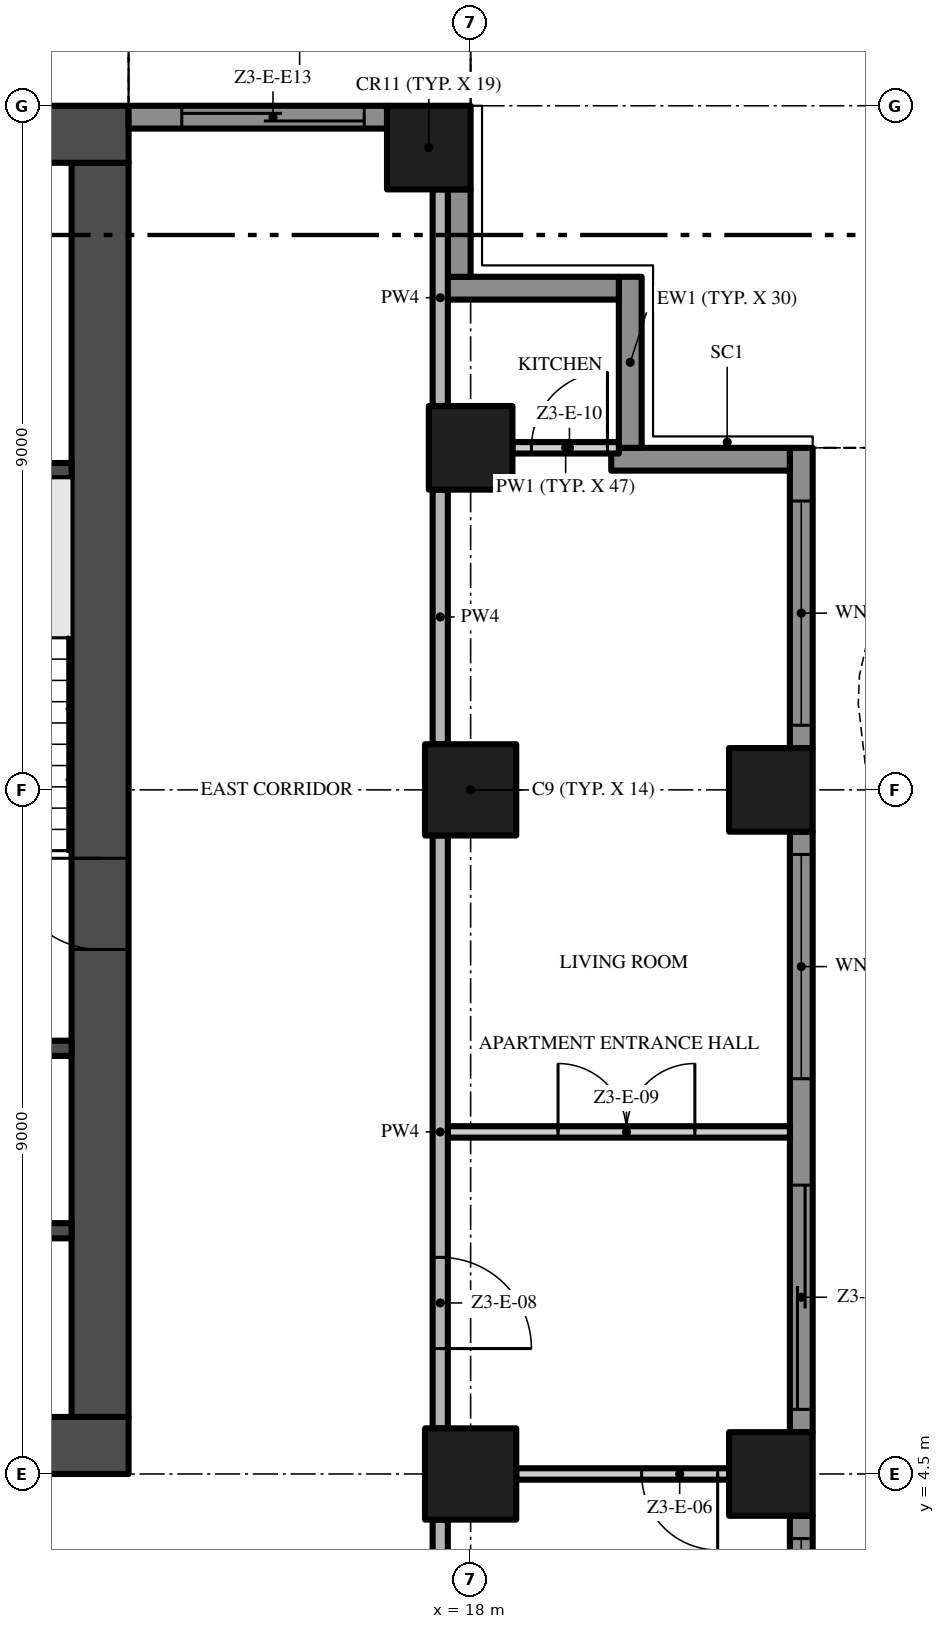
"""IFC4 building model, lengths in metres.
Left out: names, types, materials, properties, quantities, classifications, styles, units other than length and angle.
Written with IfcOpenShell. Run it as: python <this file> out.ifc"""

import sys

from ifc_helpers import new_model, si_unit, direction, frame, frame_2d, origin, origin_2d, place, context, subcontext, project, spatial, polyline, rectangle, outline, extrude, element, fill, save


model = new_model("IFC4")
c1 = context("Model", 3, precision=1e-05, world=origin(), true_north=direction((0.0, 1.0)))
c2 = subcontext(c1, "Body", "Model", "MODEL_VIEW")
j1 = project(units=[si_unit("LENGTHUNIT", "METRE"), si_unit("PLANEANGLEUNIT", "RADIAN")], contexts=[c1])
p1 = place(None, origin())
s1 = spatial("IfcSite", under=j1, at=p1, CompositionType="ELEMENT")
p2 = place(p1, origin())
s2 = spatial("IfcBuilding", under=s1, at=p2, CompositionType="ELEMENT")
p3 = place(p2, frame((0.0, 0.0, 170.6)))
s3 = spatial("IfcBuildingStorey", under=s2, at=p3, CompositionType="ELEMENT", Elevation=170.6)
p4 = place(p3, frame((-13.5, 4.875, -0.3), z_axis=(0.0, 0.0, 1.0), x_axis=(1.0, 0.0, 0.0)))
e1 = element("IfcWall", 1, at=p4, inside=s3, PredefinedType="SHEAR", context=c2, shape_type="SweptSolid", body=[
    extrude(rectangle(XDim=27.0, YDim=0.75, at=frame_2d((13.5, 0.0))), origin(), (0.0, 0.0, 1.0), 3.8),
])
p5 = place(p4, frame((12.0, 0.0, 0.3)))
e2 = element("IfcOpeningElement", 2, at=p5, cuts=e1, PredefinedType="OPENING", context=c2, shape_type="SweptSolid", body=[
    extrude(rectangle(XDim=3.0, YDim=2.4, at=frame_2d((1.5, 1.2))), frame((0.0, 0.385, 0.0), z_axis=(0.0, -1.0, 0.0), x_axis=(1.0, 0.0, 0.0)), (0.0, 0.0, 1.0), 0.77),
])
p6 = place(p4, frame((4.9, 0.0, 0.3)))
e3 = element("IfcOpeningElement", 3, at=p6, cuts=e1, PredefinedType="OPENING", context=c2, shape_type="SweptSolid", body=[
    extrude(rectangle(XDim=1.2, YDim=2.2, at=frame_2d((0.6, 1.1))), frame((0.0, 0.385, 0.0), z_axis=(0.0, -1.0, 0.0), x_axis=(1.0, 0.0, 0.0)), (0.0, 0.0, 1.0), 0.77),
])
p7 = place(p4, frame((20.75, 0.0, 0.3)))
e4 = element("IfcOpeningElement", 4, at=p7, cuts=e1, PredefinedType="OPENING", context=c2, shape_type="SweptSolid", body=[
    extrude(rectangle(XDim=1.5, YDim=2.2, at=frame_2d((0.75, 1.1))), frame((0.0, 0.385, 0.0), z_axis=(0.0, -1.0, 0.0), x_axis=(1.0, 0.0, 0.0)), (0.0, 0.0, 1.0), 0.77),
])
p8 = place(p4, frame((17.4, 0.0, 0.3)))
e5 = element("IfcOpeningElement", 5, at=p8, cuts=e1, PredefinedType="OPENING", context=c2, shape_type="SweptSolid", body=[
    extrude(rectangle(XDim=1.2, YDim=2.2, at=frame_2d((0.6, 1.1))), frame((0.0, 0.385, 0.0), z_axis=(0.0, -1.0, 0.0), x_axis=(1.0, 0.0, 0.0)), (0.0, 0.0, 1.0), 0.77),
])
p9 = place(p3, frame((13.125, 5.25, -0.3), z_axis=(0.0, 0.0, 1.0), x_axis=(0.0, 1.0, 0.0)))
e6 = element("IfcWall", 6, at=p9, inside=s3, PredefinedType="SHEAR", context=c2, shape_type="SweptSolid", body=[
    extrude(rectangle(XDim=16.5, YDim=0.75, at=frame_2d((8.25, 0.0))), origin(), (0.0, 0.0, 1.0), 3.8),
])
p10 = place(p9, frame((6.15, 0.0, 0.3)))
e7 = element("IfcOpeningElement", 7, at=p10, cuts=e6, PredefinedType="OPENING", context=c2, shape_type="SweptSolid", body=[
    extrude(rectangle(XDim=1.2, YDim=2.2, at=frame_2d((0.6, 1.1))), frame((0.0, 0.385, 0.0), z_axis=(0.0, -1.0, 0.0), x_axis=(1.0, 0.0, 0.0)), (0.0, 0.0, 1.0), 0.77),
])
p11 = place(p3, frame((13.5, 22.125, -0.3), z_axis=(0.0, 0.0, 1.0), x_axis=(-1.0, 0.0, 0.0)))
e8 = element("IfcWall", 8, at=p11, inside=s3, PredefinedType="SHEAR", context=c2, shape_type="SweptSolid", body=[
    extrude(rectangle(XDim=27.0, YDim=0.75, at=frame_2d((13.5, 0.0))), origin(), (0.0, 0.0, 1.0), 3.8),
])
p12 = place(p3, frame((18.0, 13.5, 0.0), z_axis=(0.0, 0.0, 1.0), x_axis=(1.0, 0.0, 0.0)))
e9 = element("IfcColumn", 9, at=p12, inside=s3, PredefinedType="COLUMN", context=c2, shape_type="SweptSolid", body=[
    extrude(rectangle(XDim=1.2, YDim=1.2, at=origin_2d()), origin(), (0.0, 0.0, 1.0), 3.5),
])
p13 = place(p3, frame((17.45, 21.95, 0.0), z_axis=(0.0, 0.0, 1.0), x_axis=(1.0, 0.0, 0.0)))
e10 = element("IfcColumn", 10, at=p13, inside=s3, PredefinedType="COLUMN", context=c2, shape_type="SweptSolid", body=[
    extrude(rectangle(XDim=1.1, YDim=1.1, at=origin_2d()), origin(), (0.0, 0.0, 1.0), 3.5),
])
p14 = place(p3, frame((18.0, 4.5, 0.0), z_axis=(0.0, 0.0, 1.0), x_axis=(1.0, 0.0, 0.0)))
e11 = element("IfcColumn", 11, at=p14, inside=s3, PredefinedType="COLUMN", context=c2, shape_type="SweptSolid", body=[
    extrude(rectangle(XDim=1.2, YDim=1.2, at=origin_2d()), origin(), (0.0, 0.0, 1.0), 3.5),
])
for number, where, z_axis, x_axis in (
    (12, (21.95, 13.5, 0.0), (0.0, 0.0, 1.0), (1.0, 0.0, 0.0)),
    (13, (18.0, 18.0, 0.0), (0.0, 0.0, 1.0), (1.0, 0.0, 0.0)),
    (14, (21.95, 4.5, 0.0), (0.0, 0.0, 1.0), (1.0, 0.0, 0.0)),
):
    element("IfcColumn", number, at=place(p3, frame(where, z_axis=z_axis, x_axis=x_axis)), inside=s3, PredefinedType="COLUMN", context=c2, shape_type="SweptSolid", body=[
        extrude(rectangle(XDim=1.1, YDim=1.1, at=origin_2d()), origin(), (0.0, 0.0, 1.0), 3.5),
    ])
p15 = place(p3, frame((22.35, 3.95, 0.0), z_axis=(0.0, 0.0, 1.0), x_axis=(0.0, -1.0, 0.0)))
e15 = element("IfcWall", 15, at=p15, inside=s3, PredefinedType="SOLIDWALL", context=c2, shape_type="SweptSolid", body=[
    extrude(rectangle(XDim=7.9, YDim=0.3, at=frame_2d((3.95, 0.0))), origin(), (0.0, 0.0, 1.0), 3.5),
])
p16 = place(p15, frame((4.65, 0.0, 0.45)))
e16 = element("IfcOpeningElement", 16, at=p16, cuts=e15, PredefinedType="OPENING", context=c2, shape_type="SweptSolid", body=[
    extrude(rectangle(XDim=2.95, YDim=2.65, at=frame_2d((1.475, 1.325))), frame((0.0, 0.16, 0.0), z_axis=(0.0, -1.0, 0.0), x_axis=(1.0, 0.0, 0.0)), (0.0, 0.0, 1.0), 0.32),
])
p17 = place(p15, frame((0.3, 0.0, 0.45)))
e17 = element("IfcOpeningElement", 17, at=p17, cuts=e15, PredefinedType="OPENING", context=c2, shape_type="SweptSolid", body=[
    extrude(rectangle(XDim=2.95, YDim=2.65, at=frame_2d((1.475, 1.325))), frame((0.0, 0.16, 0.0), z_axis=(0.0, -1.0, 0.0), x_axis=(1.0, 0.0, 0.0)), (0.0, 0.0, 1.0), 0.32),
])
p18 = place(p3, frame((22.35, 12.95, 0.0), z_axis=(0.0, 0.0, 1.0), x_axis=(0.0, -1.0, 0.0)))
e18 = element("IfcWall", 18, at=p18, inside=s3, PredefinedType="SOLIDWALL", context=c2, shape_type="SweptSolid", body=[
    extrude(rectangle(XDim=7.9, YDim=0.3, at=frame_2d((3.95, 0.0))), origin(), (0.0, 0.0, 1.0), 3.5),
])
p19 = place(p18, frame((4.65, 0.0, 0.0)))
e19 = element("IfcOpeningElement", 19, at=p19, cuts=e18, PredefinedType="OPENING", context=c2, shape_type="SweptSolid", body=[
    extrude(rectangle(XDim=2.95, YDim=2.4, at=frame_2d((1.475, 1.2))), frame((0.0, 0.16, 0.0), z_axis=(0.0, -1.0, 0.0), x_axis=(1.0, 0.0, 0.0)), (0.0, 0.0, 1.0), 0.32),
])
p20 = place(p18, frame((0.3, 0.0, 0.45)))
e20 = element("IfcOpeningElement", 20, at=p20, cuts=e18, PredefinedType="OPENING", context=c2, shape_type="SweptSolid", body=[
    extrude(rectangle(XDim=2.95, YDim=2.65, at=frame_2d((1.475, 1.325))), frame((0.0, 0.16, 0.0), z_axis=(0.0, -1.0, 0.0), x_axis=(1.0, 0.0, 0.0)), (0.0, 0.0, 1.0), 0.32),
])
p21 = place(p3, frame((22.35, 18.0, 0.0), z_axis=(0.0, 0.0, 1.0), x_axis=(0.0, -1.0, 0.0)))
e21 = element("IfcWall", 21, at=p21, inside=s3, PredefinedType="SOLIDWALL", context=c2, shape_type="SweptSolid", body=[
    extrude(rectangle(XDim=3.95, YDim=0.3, at=frame_2d((1.975, 0.0))), origin(), (0.0, 0.0, 1.0), 3.5),
])
p22 = place(p21, frame((0.7, 0.0, 0.45)))
e22 = element("IfcOpeningElement", 22, at=p22, cuts=e21, PredefinedType="OPENING", context=c2, shape_type="SweptSolid", body=[
    extrude(rectangle(XDim=2.95, YDim=2.65, at=frame_2d((1.475, 1.325))), frame((0.0, 0.16, 0.0), z_axis=(0.0, -1.0, 0.0), x_axis=(1.0, 0.0, 0.0)), (0.0, 0.0, 1.0), 0.32),
])
p23 = place(p3, frame((19.85, 17.85, 0.0), z_axis=(0.0, 0.0, 1.0), x_axis=(1.0, 0.0, 0.0)))
e23 = element("IfcWall", 23, at=p23, inside=s3, PredefinedType="SOLIDWALL", context=c2, shape_type="SweptSolid", body=[
    extrude(rectangle(XDim=2.35, YDim=0.3, at=frame_2d((1.175, 0.0))), origin(), (0.0, 0.0, 1.0), 3.5),
])
p24 = place(p3, frame((20.1, 20.25, 0.0), z_axis=(0.0, 0.0, 1.0), x_axis=(0.0, -1.0, 0.0)))
e24 = element("IfcWall", 24, at=p24, inside=s3, PredefinedType="SOLIDWALL", context=c2, shape_type="SweptSolid", body=[
    extrude(rectangle(XDim=2.25, YDim=0.3, at=frame_2d((1.125, 0.0))), origin(), (0.0, 0.0, 1.0), 3.5),
])
p25 = place(p3, frame((17.6, 20.1, 0.0), z_axis=(0.0, 0.0, 1.0), x_axis=(1.0, 0.0, 0.0)))
e25 = element("IfcWall", 25, at=p25, inside=s3, PredefinedType="SOLIDWALL", context=c2, shape_type="SweptSolid", body=[
    extrude(rectangle(XDim=2.35, YDim=0.3, at=frame_2d((1.175, 0.0))), origin(), (0.0, 0.0, 1.0), 3.5),
])
p26 = place(p3, frame((17.85, 21.4, 0.0), z_axis=(0.0, 0.0, 1.0), x_axis=(0.0, -1.0, 0.0)))
e26 = element("IfcWall", 26, at=p26, inside=s3, PredefinedType="SOLIDWALL", context=c2, shape_type="SweptSolid", body=[
    extrude(rectangle(XDim=1.15, YDim=0.3, at=frame_2d((0.575, 0.0))), origin(), (0.0, 0.0, 1.0), 3.5),
])
p27 = place(p3, frame((13.5, 22.35, 0.0), z_axis=(0.0, 0.0, 1.0), x_axis=(1.0, 0.0, 0.0)))
e27 = element("IfcWall", 27, at=p27, inside=s3, PredefinedType="SOLIDWALL", context=c2, shape_type="SweptSolid", body=[
    extrude(rectangle(XDim=3.4, YDim=0.3, at=frame_2d((1.7, 0.0))), origin(), (0.0, 0.0, 1.0), 3.5),
])
p28 = place(p27, frame((0.7, 0.0, 0.0)))
e28 = element("IfcOpeningElement", 28, at=p28, cuts=e27, PredefinedType="OPENING", context=c2, shape_type="SweptSolid", body=[
    extrude(rectangle(XDim=2.4, YDim=2.4, at=frame_2d((1.2, 1.2))), frame((0.0, 0.16, 0.0), z_axis=(0.0, -1.0, 0.0), x_axis=(1.0, 0.0, 0.0)), (0.0, 0.0, 1.0), 0.32),
])
p29 = place(p3, origin())
e29 = element("IfcWall", 29, at=p29, inside=s3, PredefinedType="USERDEFINED", context=c2, shape_type="SweptSolid", body=[
    extrude(outline(polyline([(23.451, -13.5), (24.112, -12.0), (24.845, -10.5), (25.369, -9.0), (25.5, -7.875), (25.485, -7.5), (25.149, -6.0), (24.488, -4.5), (23.755, -3.0), (23.231, -1.5), (23.1, -0.375), (23.115, 0.0), (23.451, 1.5), (24.112, 3.0), (24.845, 4.5), (25.369, 6.0), (25.5, 7.125), (25.485, 7.5), (25.149, 9.0), (24.488, 10.5), (23.755, 12.0), (23.231, 13.5), (23.1, 14.625), (23.115, 15.0), (23.451, 16.5), (24.112, 18.0), (23.883, 18.101), (23.213, 16.579), (22.866, 15.033), (22.849, 14.615), (22.986, 13.444), (23.524, 11.904), (24.261, 10.395), (24.91, 8.921), (25.236, 7.467), (25.249, 7.135), (25.124, 6.056), (24.614, 4.596), (23.885, 3.105), (23.213, 1.579), (22.866, 0.033), (22.849, -0.385), (22.986, -1.556), (23.524, -3.096), (24.261, -4.605), (24.91, -6.079), (25.236, -7.533), (25.249, -7.865), (25.124, -8.944), (24.614, -10.404), (23.885, -11.895), (23.223, -13.399), (23.451, -13.5)])), origin(), (0.0, 0.0, 1.0), 0.9),
])
for number, where, z_axis, x_axis in (
    (30, (9.65, 7.7, 0.0), (0.0, 0.0, 1.0), (1.0, 0.0, 0.0)),
    (31, (9.65, 10.1, 0.0), (0.0, 0.0, 1.0), (1.0, 0.0, 0.0)),
    (32, (9.65, 17.7, 0.0), (0.0, 0.0, 1.0), (1.0, 0.0, 0.0)),
):
    element("IfcWall", number, at=place(p3, frame(where, z_axis=z_axis, x_axis=x_axis)), inside=s3, PredefinedType="SHEAR", context=c2, shape_type="SweptSolid", body=[
        extrude(rectangle(XDim=3.1, YDim=0.2, at=frame_2d((1.55, 0.0))), origin(), (0.0, 0.0, 1.0), 3.5),
    ])
p30 = place(p3, frame((21.4, 4.5, 0.0), z_axis=(0.0, 0.0, 1.0), x_axis=(-1.0, 0.0, 0.0)))
e33 = element("IfcWall", 33, at=p30, inside=s3, PredefinedType="PARTITIONING", context=c2, shape_type="SweptSolid", body=[
    extrude(rectangle(XDim=2.8, YDim=0.15, at=frame_2d((1.4, 0.0))), origin(), (0.0, 0.0, 1.0), 3.5),
])
p31 = place(p30, frame((0.15, 0.0, 0.0)))
e34 = element("IfcOpeningElement", 34, at=p31, cuts=e33, PredefinedType="OPENING", context=c2, shape_type="SweptSolid", body=[
    extrude(rectangle(XDim=1.0, YDim=2.4, at=frame_2d((0.5, 1.2))), frame((0.0, 0.085, 0.0), z_axis=(0.0, -1.0, 0.0), x_axis=(1.0, 0.0, 0.0)), (0.0, 0.0, 1.0), 0.17),
])
p32 = place(p3, frame((17.7, 9.0, 0.0), z_axis=(0.0, 0.0, 1.0), x_axis=(1.0, 0.0, 0.0)))
e35 = element("IfcWall", 35, at=p32, inside=s3, PredefinedType="PARTITIONING", context=c2, shape_type="SweptSolid", body=[
    extrude(rectangle(XDim=4.5, YDim=0.15, at=frame_2d((2.25, 0.0))), origin(), (0.0, 0.0, 1.0), 3.5),
])
p33 = place(p32, frame((1.45, 0.0, 0.0)))
e36 = element("IfcOpeningElement", 36, at=p33, cuts=e35, PredefinedType="OPENING", context=c2, shape_type="SweptSolid", body=[
    extrude(rectangle(XDim=1.8, YDim=2.4, at=frame_2d((0.9, 1.2))), frame((0.0, 0.085, 0.0), z_axis=(0.0, -1.0, 0.0), x_axis=(1.0, 0.0, 0.0)), (0.0, 0.0, 1.0), 0.17),
])
p34 = place(p3, frame((18.55, 18.0, 0.0), z_axis=(0.0, 0.0, 1.0), x_axis=(1.0, 0.0, 0.0)))
e37 = element("IfcWall", 37, at=p34, inside=s3, PredefinedType="PARTITIONING", context=c2, shape_type="SweptSolid", body=[
    extrude(rectangle(XDim=1.4, YDim=0.15, at=frame_2d((0.7, 0.0))), origin(), (0.0, 0.0, 1.0), 3.5),
])
p35 = place(p34, frame((0.25, 0.0, 0.0)))
e38 = element("IfcOpeningElement", 38, at=p35, cuts=e37, PredefinedType="OPENING", context=c2, shape_type="SweptSolid", body=[
    extrude(rectangle(XDim=1.0, YDim=2.4, at=frame_2d((0.5, 1.2))), frame((0.0, 0.085, 0.0), z_axis=(0.0, -1.0, 0.0), x_axis=(1.0, 0.0, 0.0)), (0.0, 0.0, 1.0), 0.17),
])
p36 = place(p3, frame((17.6, -0.2, 0.0), z_axis=(0.0, 0.0, 1.0), x_axis=(0.0, 1.0, 0.0)))
e39 = element("IfcWall", 39, at=p36, inside=s3, PredefinedType="PARTITIONING", context=c2, shape_type="SweptSolid", body=[
    extrude(rectangle(XDim=4.1, YDim=0.2, at=frame_2d((2.05, 0.0))), origin(), (0.0, 0.0, 1.0), 3.5),
])
p37 = place(p3, frame((17.6, 12.9, 0.0), z_axis=(0.0, 0.0, 1.0), x_axis=(0.0, -1.0, 0.0)))
e40 = element("IfcWall", 40, at=p37, inside=s3, PredefinedType="PARTITIONING", context=c2, shape_type="SweptSolid", body=[
    extrude(rectangle(XDim=7.8, YDim=0.2, at=frame_2d((3.9, 0.0))), origin(), (0.0, 0.0, 1.0), 3.5),
])
p38 = place(p37, frame((5.55, 0.0, 0.0)))
e41 = element("IfcOpeningElement", 41, at=p38, cuts=e40, PredefinedType="OPENING", context=c2, shape_type="SweptSolid", body=[
    extrude(rectangle(XDim=1.2, YDim=2.4, at=frame_2d((0.6, 1.2))), frame((0.0, 0.11, 0.0), z_axis=(0.0, -1.0, 0.0), x_axis=(1.0, 0.0, 0.0)), (0.0, 0.0, 1.0), 0.22),
])
p39 = place(p3, frame((17.6, 14.1, 0.0), z_axis=(0.0, 0.0, 1.0), x_axis=(0.0, 1.0, 0.0)))
e42 = element("IfcWall", 42, at=p39, inside=s3, PredefinedType="PARTITIONING", context=c2, shape_type="SweptSolid", body=[
    extrude(rectangle(XDim=3.35, YDim=0.2, at=frame_2d((1.675, 0.0))), origin(), (0.0, 0.0, 1.0), 3.5),
])
p40 = place(p3, frame((17.6, 18.55, 0.0), z_axis=(0.0, 0.0, 1.0), x_axis=(0.0, 1.0, 0.0)))
e43 = element("IfcWall", 43, at=p40, inside=s3, PredefinedType="PARTITIONING", context=c2, shape_type="SweptSolid", body=[
    extrude(rectangle(XDim=2.85, YDim=0.2, at=frame_2d((1.425, 0.0))), origin(), (0.0, 0.0, 1.0), 3.5),
])
p41 = place(p17, origin())
e44 = element("IfcWindow", 44, at=p41, inside=s3, PartitioningType="SINGLE_PANEL", PredefinedType="WINDOW", context=c2, shape_type="SweptSolid", body=[
    extrude(rectangle(XDim=2.95, YDim=2.65, at=frame_2d((1.475, 1.325))), frame((0.0, 0.03, 0.0), z_axis=(0.0, -1.0, 0.0), x_axis=(1.0, 0.0, 0.0)), (0.0, 0.0, 1.0), 0.06),
])
fill(e17, e44)
p42 = place(p19, origin())
e45 = element("IfcDoor", 45, at=p42, inside=s3, OperationType="SINGLE_SWING_LEFT", PredefinedType="DOOR", context=c2, shape_type="SweptSolid", body=[
    extrude(rectangle(XDim=2.95, YDim=2.4, at=frame_2d((1.475, 1.2))), frame((0.0, 0.025, 0.0), z_axis=(0.0, -1.0, 0.0), x_axis=(1.0, 0.0, 0.0)), (0.0, 0.0, 1.0), 0.05),
])
fill(e19, e45)
p43 = place(p20, origin())
e46 = element("IfcWindow", 46, at=p43, inside=s3, PartitioningType="SINGLE_PANEL", PredefinedType="WINDOW", context=c2, shape_type="SweptSolid", body=[
    extrude(rectangle(XDim=2.95, YDim=2.65, at=frame_2d((1.475, 1.325))), frame((0.0, 0.03, 0.0), z_axis=(0.0, -1.0, 0.0), x_axis=(1.0, 0.0, 0.0)), (0.0, 0.0, 1.0), 0.06),
])
fill(e20, e46)
p44 = place(p22, origin())
e47 = element("IfcWindow", 47, at=p44, inside=s3, PartitioningType="SINGLE_PANEL", PredefinedType="WINDOW", context=c2, shape_type="SweptSolid", body=[
    extrude(rectangle(XDim=2.95, YDim=2.65, at=frame_2d((1.475, 1.325))), frame((0.0, 0.03, 0.0), z_axis=(0.0, -1.0, 0.0), x_axis=(1.0, 0.0, 0.0)), (0.0, 0.0, 1.0), 0.06),
])
fill(e22, e47)
p45 = place(p28, origin())
e48 = element("IfcDoor", 48, at=p45, inside=s3, OperationType="SINGLE_SWING_LEFT", PredefinedType="DOOR", context=c2, shape_type="SweptSolid", body=[
    extrude(rectangle(XDim=2.4, YDim=2.4, at=frame_2d((1.2, 1.2))), frame((0.0, 0.025, 0.0), z_axis=(0.0, -1.0, 0.0), x_axis=(1.0, 0.0, 0.0)), (0.0, 0.0, 1.0), 0.05),
])
fill(e28, e48)
p46 = place(p10, frame((1.2, 0.0, 0.0), z_axis=(0.0, 0.0, 1.0), x_axis=(-1.0, 0.0, 0.0)))
e49 = element("IfcDoor", 49, at=p46, inside=s3, OperationType="SINGLE_SWING_LEFT", PredefinedType="DOOR", context=c2, shape_type="SweptSolid", body=[
    extrude(rectangle(XDim=1.2, YDim=2.2, at=frame_2d((0.6, 1.1))), frame((0.0, 0.025, 0.0), z_axis=(0.0, -1.0, 0.0), x_axis=(1.0, 0.0, 0.0)), (0.0, 0.0, 1.0), 0.05),
])
fill(e7, e49)
p47 = place(p31, origin())
e50 = element("IfcDoor", 50, at=p47, inside=s3, OperationType="SINGLE_SWING_LEFT", PredefinedType="DOOR", context=c2, shape_type="SweptSolid", body=[
    extrude(rectangle(XDim=1.0, YDim=2.4, at=frame_2d((0.5, 1.2))), frame((0.0, 0.025, 0.0), z_axis=(0.0, -1.0, 0.0), x_axis=(1.0, 0.0, 0.0)), (0.0, 0.0, 1.0), 0.05),
])
fill(e34, e50)
p48 = place(p38, origin())
e51 = element("IfcDoor", 51, at=p48, inside=s3, OperationType="SINGLE_SWING_RIGHT", PredefinedType="DOOR", context=c2, shape_type="SweptSolid", body=[
    extrude(rectangle(XDim=1.2, YDim=2.4, at=frame_2d((0.6, 1.2))), frame((0.0, 0.025, 0.0), z_axis=(0.0, -1.0, 0.0), x_axis=(1.0, 0.0, 0.0)), (0.0, 0.0, 1.0), 0.05),
])
fill(e41, e51)
p49 = place(p33, origin())
e52 = element("IfcDoor", 52, at=p49, inside=s3, OperationType="DOUBLE_DOOR_SINGLE_SWING", PredefinedType="DOOR", context=c2, shape_type="SweptSolid", body=[
    extrude(rectangle(XDim=1.8, YDim=2.4, at=frame_2d((0.9, 1.2))), frame((0.0, 0.025, 0.0), z_axis=(0.0, -1.0, 0.0), x_axis=(1.0, 0.0, 0.0)), (0.0, 0.0, 1.0), 0.05),
])
fill(e36, e52)
p50 = place(p35, origin())
e53 = element("IfcDoor", 53, at=p50, inside=s3, OperationType="SINGLE_SWING_RIGHT", PredefinedType="DOOR", context=c2, shape_type="SweptSolid", body=[
    extrude(rectangle(XDim=1.0, YDim=2.4, at=frame_2d((0.5, 1.2))), frame((0.0, 0.025, 0.0), z_axis=(0.0, -1.0, 0.0), x_axis=(1.0, 0.0, 0.0)), (0.0, 0.0, 1.0), 0.05),
])
fill(e38, e53)
save(model, sys.argv[1])
